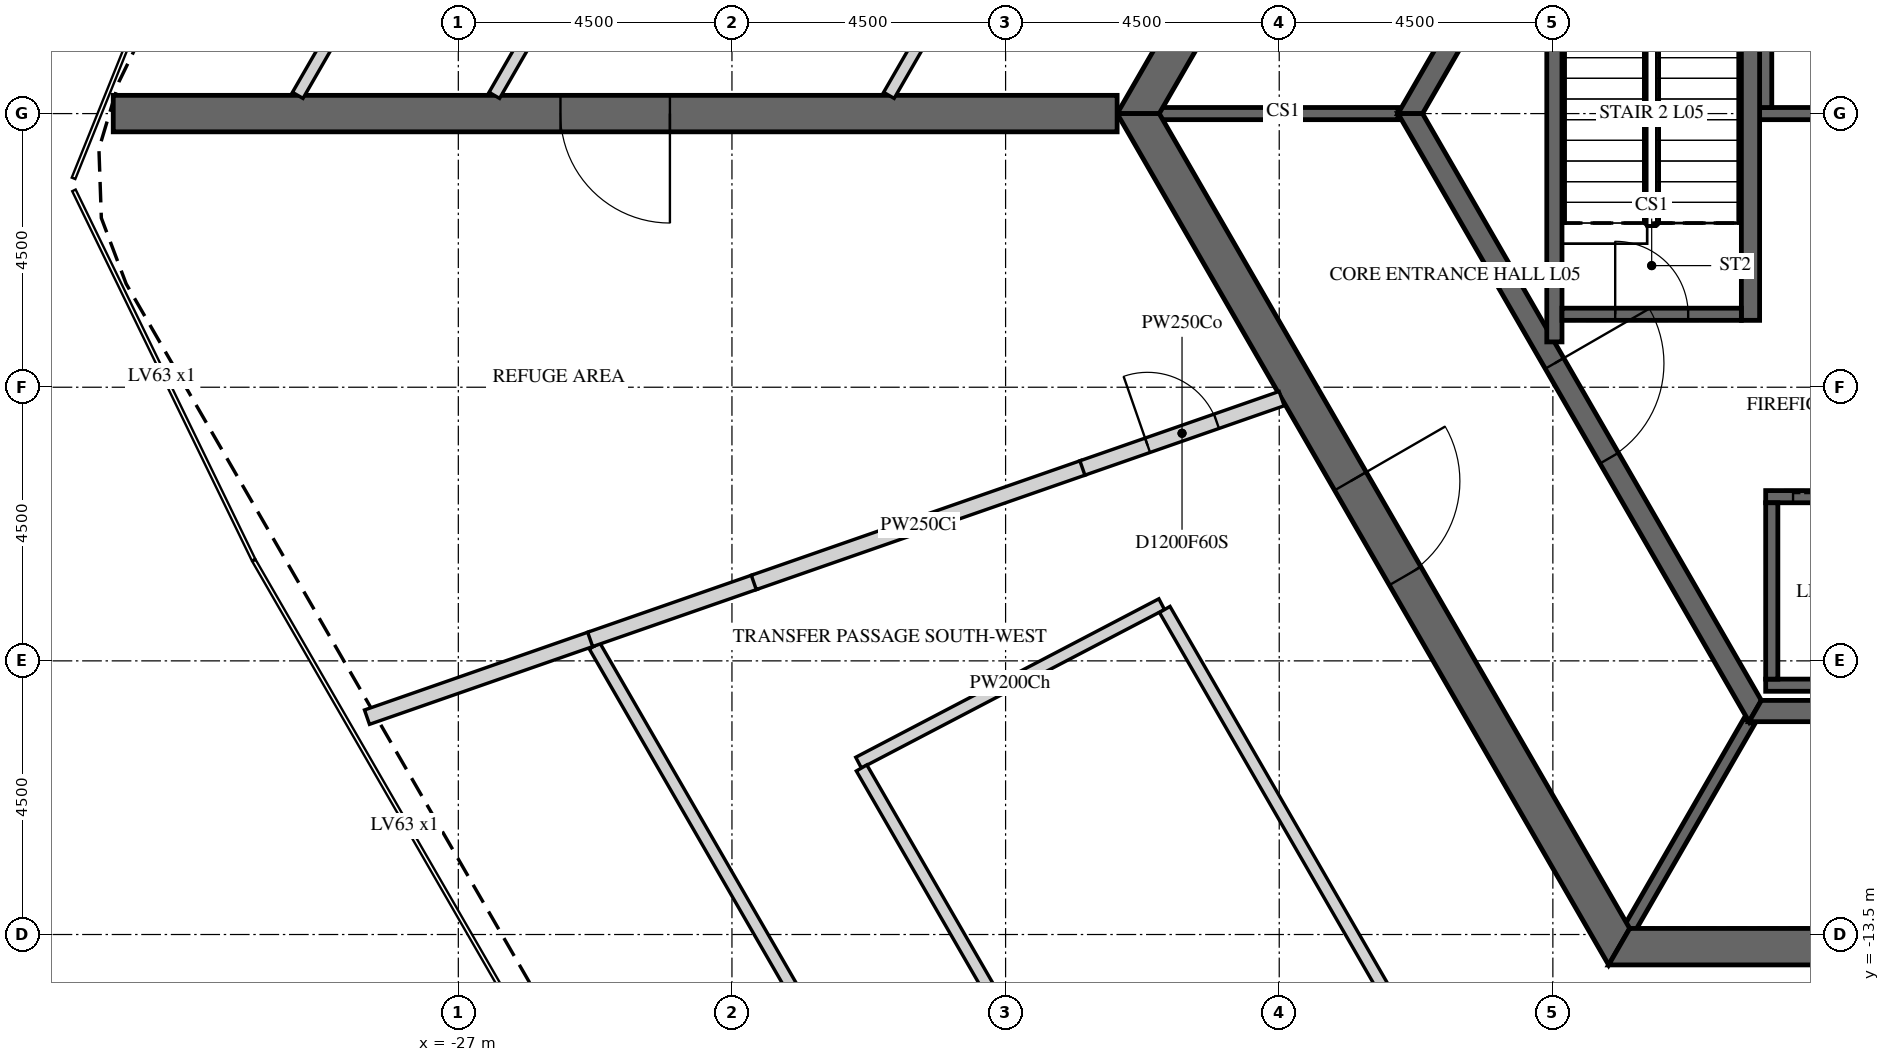
"""IFC4 building model, lengths in metres.
Left out: names, types, materials, properties, quantities, classifications, styles, units other than length and angle.
Written with IfcOpenShell. Run it as: python <this file> out.ifc"""

import sys

from ifc_helpers import new_model, si_unit, direction, frame, frame_2d, origin, place, context, subcontext, project, spatial, polyline, rectangle, outline, extrude, element, fill, save


model = new_model("IFC4")
c1 = context("Model", 3, precision=1e-05, world=origin(), true_north=direction((0.0, 1.0)))
c2 = subcontext(c1, "Body", "Model", "MODEL_VIEW")
j1 = project(units=[si_unit("LENGTHUNIT", "METRE"), si_unit("PLANEANGLEUNIT", "RADIAN")], contexts=[c1])
p1 = place(None, origin())
s1 = spatial("IfcSite", under=j1, at=p1, CompositionType="ELEMENT")
p2 = place(p1, origin())
s2 = spatial("IfcBuilding", under=s1, at=p2, CompositionType="ELEMENT")
p3 = place(p2, frame((0.0, 0.0, 31.5)))
s3 = spatial("IfcBuildingStorey", under=s2, at=p3, CompositionType="ELEMENT", Elevation=31.5)
p4 = place(p3, frame((-7.91, 13.7, -0.3), z_axis=(0.0, 0.0, 1.0), x_axis=(-0.499999880136, -0.866025472988, 0.0)))
e1 = element("IfcWall", 1, at=p4, inside=s3, PredefinedType="SHEAR", context=c2, shape_type="SweptSolid", body=[
    extrude(outline(polyline([(-0.173, -0.3), (15.993, -0.3), (15.646, 0.3), (0.173, 0.3), (-0.173, -0.3)])), origin(), (0.0, 0.0, 1.0), 6.15),
])
p5 = place(p4, frame((7.039, 0.0, 0.3)))
e2 = element("IfcOpeningElement", 2, at=p5, cuts=e1, PredefinedType="OPENING", context=c2, shape_type="SweptSolid", body=[
    extrude(rectangle(XDim=1.8, YDim=2.4, at=frame_2d((0.9, 1.2))), frame((0.0, 0.31, 0.0), z_axis=(0.0, -1.0, 0.0), x_axis=(1.0, 0.0, 0.0)), (0.0, 0.0, 1.0), 0.62),
])
p6 = place(p3, frame((-15.819, 0.0, -0.3), z_axis=(0.0, 0.0, 1.0), x_axis=(0.499999880136, -0.866025472988, 0.0)))
e3 = element("IfcWall", 3, at=p6, inside=s3, PredefinedType="SHEAR", context=c2, shape_type="SweptSolid", body=[
    extrude(outline(polyline([(-0.173, -0.3), (15.993, -0.3), (15.646, 0.3), (0.173, 0.3), (-0.173, -0.3)])), origin(), (0.0, 0.0, 1.0), 6.15),
])
p7 = place(p6, frame((6.981, 0.0, 0.3)))
e4 = element("IfcOpeningElement", 4, at=p7, cuts=e3, PredefinedType="OPENING", context=c2, shape_type="SweptSolid", body=[
    extrude(rectangle(XDim=1.8, YDim=2.4, at=frame_2d((0.9, 1.2))), frame((0.0, 0.31, 0.0), z_axis=(0.0, -1.0, 0.0), x_axis=(1.0, 0.0, 0.0)), (0.0, 0.0, 1.0), 0.62),
])
p8 = place(p3, frame((-7.91, -13.7, -0.3), z_axis=(0.0, 0.0, 1.0), x_axis=(1.0, 0.0, 0.0)))
e5 = element("IfcWall", 5, at=p8, inside=s3, PredefinedType="SHEAR", context=c2, shape_type="SweptSolid", body=[
    extrude(outline(polyline([(-0.173, -0.3), (15.993, -0.3), (15.646, 0.3), (0.173, 0.3), (-0.173, -0.3)])), origin(), (0.0, 0.0, 1.0), 6.15),
])
p9 = place(p8, frame((7.31, 0.0, 0.3)))
e6 = element("IfcOpeningElement", 6, at=p9, cuts=e5, PredefinedType="OPENING", context=c2, shape_type="SweptSolid", body=[
    extrude(rectangle(XDim=1.2, YDim=2.4, at=frame_2d((0.6, 1.2))), frame((0.0, 0.31, 0.0), z_axis=(0.0, -1.0, 0.0), x_axis=(1.0, 0.0, 0.0)), (0.0, 0.0, 1.0), 0.62),
])
p10 = place(p3, frame((-16.166, 0.0, -0.3), z_axis=(0.0, 0.0, 1.0), x_axis=(-1.0, 0.0, 0.0)))
e7 = element("IfcWall", 7, at=p10, inside=s3, PredefinedType="SHEAR", context=c2, shape_type="SweptSolid", body=[
    extrude(rectangle(XDim=16.509, YDim=0.6, at=frame_2d((8.254, 0.0))), origin(), (0.0, 0.0, 1.0), 6.15),
])
p11 = place(p10, frame((7.354, 0.0, 0.3)))
e8 = element("IfcOpeningElement", 8, at=p11, cuts=e7, PredefinedType="OPENING", context=c2, shape_type="SweptSolid", body=[
    extrude(rectangle(XDim=1.8, YDim=2.4, at=frame_2d((0.9, 1.2))), frame((0.0, 0.31, 0.0), z_axis=(0.0, -1.0, 0.0), x_axis=(1.0, 0.0, 0.0)), (0.0, 0.0, 1.0), 0.62),
])
p12 = place(p3, frame((-5.673, 9.825, -0.3), z_axis=(0.0, 0.0, 1.0), x_axis=(-0.499995046907, -0.866028263435, 0.0)))
e9 = element("IfcWall", 9, at=p12, inside=s3, PredefinedType="SHEAR", context=c2, shape_type="SweptSolid", body=[
    extrude(outline(polyline([(-0.101, -0.175), (11.446, -0.175), (11.244, 0.175), (0.101, 0.175), (-0.101, -0.175)])), origin(), (0.0, 0.0, 1.0), 6.15),
])
p13 = place(p12, frame((4.801, 0.0, 0.3)))
e10 = element("IfcOpeningElement", 10, at=p13, cuts=e9, PredefinedType="OPENING", context=c2, shape_type="SweptSolid", body=[
    extrude(rectangle(XDim=1.8, YDim=2.4, at=frame_2d((0.9, 1.2))), frame((0.0, 0.185, 0.0), z_axis=(0.0, -1.0, 0.0), x_axis=(1.0, 0.0, 0.0)), (0.0, 0.0, 1.0), 0.37),
])
p14 = place(p3, frame((-11.345, 0.0, -0.3), z_axis=(0.0, 0.0, 1.0), x_axis=(0.499995046907, -0.866028263435, 0.0)))
e11 = element("IfcWall", 11, at=p14, inside=s3, PredefinedType="SHEAR", context=c2, shape_type="SweptSolid", body=[
    extrude(outline(polyline([(-0.101, -0.175), (11.446, -0.175), (11.244, 0.175), (0.101, 0.175), (-0.101, -0.175)])), origin(), (0.0, 0.0, 1.0), 6.15),
])
p15 = place(p14, frame((4.744, 0.0, 0.3)))
e12 = element("IfcOpeningElement", 12, at=p15, cuts=e11, PredefinedType="OPENING", context=c2, shape_type="SweptSolid", body=[
    extrude(rectangle(XDim=1.8, YDim=2.4, at=frame_2d((0.9, 1.2))), frame((0.0, 0.185, 0.0), z_axis=(0.0, -1.0, 0.0), x_axis=(1.0, 0.0, 0.0)), (0.0, 0.0, 1.0), 0.37),
])
p16 = place(p3, frame((-5.673, -9.825, -0.3), z_axis=(0.0, 0.0, 1.0), x_axis=(1.0, 0.0, 0.0)))
e13 = element("IfcWall", 13, at=p16, inside=s3, PredefinedType="SHEAR", context=c2, shape_type="SweptSolid", body=[
    extrude(outline(polyline([(-0.101, -0.175), (11.446, -0.175), (11.244, 0.175), (0.101, 0.175), (-0.101, -0.175)])), origin(), (0.0, 0.0, 1.0), 6.15),
])
p17 = place(p3, frame((-5.6, 0.0, -0.25), z_axis=(0.0, 0.0, 1.0), x_axis=(1.0, 0.0, 0.0)))
e14 = element("IfcWall", 14, at=p17, inside=s3, PredefinedType="SHEAR", context=c2, shape_type="SweptSolid", body=[
    extrude(rectangle(XDim=11.2, YDim=0.2, at=frame_2d((5.6, 0.0))), origin(), (0.0, 0.0, 1.0), 6.0),
])
p18 = place(p3, frame((-5.5, 0.1, -0.25), z_axis=(0.0, 0.0, 1.0), x_axis=(0.0, 1.0, 0.0)))
e15 = element("IfcWall", 15, at=p18, inside=s3, PredefinedType="SHEAR", context=c2, shape_type="SweptSolid", body=[
    extrude(rectangle(XDim=3.1, YDim=0.2, at=frame_2d((1.55, 0.0))), origin(), (0.0, 0.0, 1.0), 6.0),
])
p19 = place(p3, frame((-5.5, -6.3, -0.25), z_axis=(0.0, 0.0, 1.0), x_axis=(1.0, 0.0, 0.0)))
e16 = element("IfcWall", 16, at=p19, inside=s3, PredefinedType="SHEAR", context=c2, shape_type="SweptSolid", body=[
    extrude(rectangle(XDim=9.2, YDim=0.2, at=frame_2d((4.6, 0.0))), origin(), (0.0, 0.0, 1.0), 6.0),
])
p20 = place(p19, frame((0.45, 0.0, 0.25)))
e17 = element("IfcOpeningElement", 17, at=p20, cuts=e16, PredefinedType="OPENING", context=c2, shape_type="SweptSolid", body=[
    extrude(rectangle(XDim=1.1, YDim=2.1, at=frame_2d((0.55, 1.05))), frame((0.0, 0.11, 0.0), z_axis=(0.0, -1.0, 0.0), x_axis=(1.0, 0.0, 0.0)), (0.0, 0.0, 1.0), 0.22),
])
p21 = place(p19, frame((2.25, 0.0, 0.25)))
e18 = element("IfcOpeningElement", 18, at=p21, cuts=e16, PredefinedType="OPENING", context=c2, shape_type="SweptSolid", body=[
    extrude(rectangle(XDim=1.1, YDim=2.1, at=frame_2d((0.55, 1.05))), frame((0.0, 0.11, 0.0), z_axis=(0.0, -1.0, 0.0), x_axis=(1.0, 0.0, 0.0)), (0.0, 0.0, 1.0), 0.22),
])
p22 = place(p19, frame((4.05, 0.0, 0.25)))
e19 = element("IfcOpeningElement", 19, at=p22, cuts=e16, PredefinedType="OPENING", context=c2, shape_type="SweptSolid", body=[
    extrude(rectangle(XDim=1.1, YDim=2.1, at=frame_2d((0.55, 1.05))), frame((0.0, 0.11, 0.0), z_axis=(0.0, -1.0, 0.0), x_axis=(1.0, 0.0, 0.0)), (0.0, 0.0, 1.0), 0.22),
])
p23 = place(p19, frame((5.85, 0.0, 0.25)))
e20 = element("IfcOpeningElement", 20, at=p23, cuts=e16, PredefinedType="OPENING", context=c2, shape_type="SweptSolid", body=[
    extrude(rectangle(XDim=1.1, YDim=2.1, at=frame_2d((0.55, 1.05))), frame((0.0, 0.11, 0.0), z_axis=(0.0, -1.0, 0.0), x_axis=(1.0, 0.0, 0.0)), (0.0, 0.0, 1.0), 0.22),
])
p24 = place(p19, frame((7.65, 0.0, 0.25)))
e21 = element("IfcOpeningElement", 21, at=p24, cuts=e16, PredefinedType="OPENING", context=c2, shape_type="SweptSolid", body=[
    extrude(rectangle(XDim=1.1, YDim=2.1, at=frame_2d((0.55, 1.05))), frame((0.0, 0.11, 0.0), z_axis=(0.0, -1.0, 0.0), x_axis=(1.0, 0.0, 0.0)), (0.0, 0.0, 1.0), 0.22),
])
p25 = place(p3, frame((-5.5, -9.4, -0.25), z_axis=(0.0, 0.0, 1.0), x_axis=(1.0, 0.0, 0.0)))
e22 = element("IfcWall", 22, at=p25, inside=s3, PredefinedType="SHEAR", context=c2, shape_type="SweptSolid", body=[
    extrude(rectangle(XDim=9.2, YDim=0.2, at=frame_2d((4.6, 0.0))), origin(), (0.0, 0.0, 1.0), 6.0),
])
p26 = place(p3, frame((-5.4, -9.3, -0.25), z_axis=(0.0, 0.0, 1.0), x_axis=(0.0, 1.0, 0.0)))
e23 = element("IfcWall", 23, at=p26, inside=s3, PredefinedType="SHEAR", context=c2, shape_type="SweptSolid", body=[
    extrude(rectangle(XDim=2.9, YDim=0.2, at=frame_2d((1.45, 0.0))), origin(), (0.0, 0.0, 1.0), 6.0),
])
p27 = place(p3, frame((-11.547, 0.0, -0.3), z_axis=(0.0, 0.0, 1.0), x_axis=(-1.0, 0.0, 0.0)))
e24 = element("IfcWall", 24, at=p27, inside=s3, PredefinedType="SHEAR", context=c2, shape_type="SweptSolid", body=[
    extrude(rectangle(XDim=3.926, YDim=0.2, at=frame_2d((1.963, 0.0))), origin(), (0.0, 0.0, 1.0), 6.15),
])
p28 = place(p3, frame((-5.773, -10.0, -0.3), z_axis=(0.0, 0.0, 1.0), x_axis=(-0.500038251005, -0.86600331843, 0.0)))
e25 = element("IfcWall", 25, at=p28, inside=s3, PredefinedType="SHEAR", context=c2, shape_type="SweptSolid", body=[
    extrude(rectangle(XDim=3.926, YDim=0.2, at=frame_2d((1.963, 0.0))), origin(), (0.0, 0.0, 1.0), 6.15),
])
p29 = place(p3, frame((-5.75, -3.4, -0.25), z_axis=(0.0, 0.0, 1.0), x_axis=(0.0, 1.0, 0.0)))
e26 = element("IfcWall", 26, at=p29, inside=s3, PredefinedType="SHEAR", context=c2, shape_type="SweptSolid", body=[
    extrude(rectangle(XDim=6.8, YDim=0.3, at=frame_2d((3.4, 0.0))), origin(), (0.0, 0.0, 1.0), 6.0),
])
p30 = place(p3, frame((-8.975, -3.755, -0.25), z_axis=(0.0, 0.0, 1.0), x_axis=(0.0, 1.0, 0.0)))
e27 = element("IfcWall", 27, at=p30, inside=s3, PredefinedType="SHEAR", context=c2, shape_type="SweptSolid", body=[
    extrude(rectangle(XDim=7.51, YDim=0.25, at=frame_2d((3.755, 0.0))), origin(), (0.0, 0.0, 1.0), 6.0),
])
p31 = place(p3, frame((-8.85, -3.3, -0.25), z_axis=(0.0, 0.0, 1.0), x_axis=(1.0, 0.0, 0.0)))
e28 = element("IfcWall", 28, at=p31, inside=s3, PredefinedType="SHEAR", context=c2, shape_type="SweptSolid", body=[
    extrude(rectangle(XDim=2.95, YDim=0.2, at=frame_2d((1.475, 0.0))), origin(), (0.0, 0.0, 1.0), 6.0),
])
p32 = place(p31, frame((0.875, 0.0, 0.25)))
e29 = element("IfcOpeningElement", 29, at=p32, cuts=e28, PredefinedType="OPENING", context=c2, shape_type="SweptSolid", body=[
    extrude(rectangle(XDim=1.2, YDim=2.4, at=frame_2d((0.6, 1.2))), frame((0.0, 0.11, 0.0), z_axis=(0.0, -1.0, 0.0), x_axis=(1.0, 0.0, 0.0)), (0.0, 0.0, 1.0), 0.22),
])
p33 = place(p3, frame((-15.379, 19.403, 0.0), z_axis=(0.0, 0.0, 1.0), x_axis=(-0.499997101594, -0.866027077174, 0.0)))
e30 = element("IfcWall", 30, at=p33, inside=s3, PredefinedType="PARTITIONING", context=c2, shape_type="SweptSolid", body=[
    extrude(rectangle(XDim=22.058, YDim=0.2, at=frame_2d((11.029, 0.0))), origin(), (0.0, 0.0, 1.0), 5.85),
])
p34 = place(p33, frame((10.529, 0.0, 0.0)))
e31 = element("IfcOpeningElement", 31, at=p34, cuts=e30, PredefinedType="OPENING", context=c2, shape_type="SweptSolid", body=[
    extrude(rectangle(XDim=1.0, YDim=2.1, at=frame_2d((0.5, 1.05))), frame((0.0, 0.11, 0.0), z_axis=(0.0, -1.0, 0.0), x_axis=(1.0, 0.0, 0.0)), (0.0, 0.0, 1.0), 0.22),
])
p35 = place(p3, frame((-16.286, -23.432, 0.0), z_axis=(0.0, 0.0, 1.0), x_axis=(-0.49996436611, 0.866045976043, 0.0)))
e32 = element("IfcWall", 32, at=p35, inside=s3, PredefinedType="PARTITIONING", context=c2, shape_type="SweptSolid", body=[
    extrude(rectangle(XDim=16.948, YDim=0.2, at=frame_2d((8.474, 0.0))), origin(), (0.0, 0.0, 1.0), 5.85),
])
p36 = place(p35, frame((7.974, 0.0, 0.0)))
e33 = element("IfcOpeningElement", 33, at=p36, cuts=e32, PredefinedType="OPENING", context=c2, shape_type="SweptSolid", body=[
    extrude(rectangle(XDim=1.0, YDim=2.1, at=frame_2d((0.5, 1.05))), frame((0.0, 0.11, 0.0), z_axis=(0.0, -1.0, 0.0), x_axis=(1.0, 0.0, 0.0)), (0.0, 0.0, 1.0), 0.22),
])
p37 = place(p3, frame((-24.813, -8.641, 0.0), z_axis=(0.0, 0.0, 1.0), x_axis=(-0.944373627708, -0.328874522105, 0.0)))
e34 = element("IfcWall", 34, at=p37, inside=s3, PredefinedType="PARTITIONING", context=c2, shape_type="SweptSolid", body=[
    extrude(rectangle(XDim=3.906, YDim=0.25, at=frame_2d((1.953, 0.0))), origin(), (0.0, 0.0, 1.0), 5.088),
])
p38 = place(p3, frame((-22.122, -7.704, 0.0), z_axis=(0.0, 0.0, 1.0), x_axis=(-0.944466947751, -0.328606428127, 0.0)))
e35 = element("IfcWall", 35, at=p38, inside=s3, PredefinedType="PARTITIONING", context=c2, shape_type="SweptSolid", body=[
    extrude(rectangle(XDim=2.869, YDim=0.25, at=frame_2d((1.435, 0.0))), origin(), (0.0, 0.0, 1.0), 5.088),
])
p39 = place(p3, frame((-20.418, -10.674, 0.0), z_axis=(0.0, 0.0, 1.0), x_axis=(0.886208434204, 0.463286748295, 0.0)))
e36 = element("IfcWall", 36, at=p39, inside=s3, PredefinedType="PARTITIONING", context=c2, shape_type="SweptSolid", body=[
    extrude(rectangle(XDim=5.625, YDim=0.2, at=frame_2d((2.812, 0.0))), origin(), (0.0, 0.0, 1.0), 5.096),
])
p40 = place(p3, frame((-29.641, 0.3, 0.0), z_axis=(0.0, 0.0, 1.0), x_axis=(0.49998168022, 0.866035980456, 0.0)))
e37 = element("IfcWall", 37, at=p40, inside=s3, PredefinedType="PARTITIONING", context=c2, shape_type="SweptSolid", body=[
    extrude(rectangle(XDim=19.947, YDim=0.2, at=frame_2d((9.973, 0.0))), origin(), (0.0, 0.0, 1.0), 5.85),
])
p41 = place(p40, frame((9.473, 0.0, 0.0)))
e38 = element("IfcOpeningElement", 38, at=p41, cuts=e37, PredefinedType="OPENING", context=c2, shape_type="SweptSolid", body=[
    extrude(rectangle(XDim=1.0, YDim=2.1, at=frame_2d((0.5, 1.05))), frame((0.0, 0.11, 0.0), z_axis=(0.0, -1.0, 0.0), x_axis=(1.0, 0.0, 0.0)), (0.0, 0.0, 1.0), 0.22),
])
p42 = place(p3, frame((-16.718, -5.822, 0.0), z_axis=(0.0, 0.0, 1.0), x_axis=(-0.944407858517, -0.328776210774, 0.0)))
e39 = element("IfcWall", 39, at=p42, inside=s3, PredefinedType="PARTITIONING", context=c2, shape_type="SweptSolid", body=[
    extrude(rectangle(XDim=5.742, YDim=0.25, at=frame_2d((2.871, 0.0))), origin(), (0.0, 0.0, 1.0), 5.088),
])
p43 = place(p3, frame((-15.383, -8.155, 0.0), z_axis=(0.0, 0.0, 1.0), x_axis=(0.499963979216, -0.866046199395, 0.0)))
e40 = element("IfcWall", 40, at=p43, inside=s3, PredefinedType="PARTITIONING", context=c2, shape_type="SweptSolid", body=[
    extrude(rectangle(XDim=10.675, YDim=0.2, at=frame_2d((5.337, 0.0))), origin(), (0.0, 0.0, 1.0), 5.85),
])
p44 = place(p3, frame((-16.737, -5.828, 0.0), z_axis=(0.0, 0.0, 1.0), x_axis=(0.944406589831, 0.328779855046, 0.0)))
e41 = element("IfcWall", 41, at=p44, inside=s3, PredefinedType="PARTITIONING", context=c2, shape_type="SweptSolid", body=[
    extrude(rectangle(XDim=3.47, YDim=0.25, at=frame_2d((1.735, 0.0))), origin(), (0.0, 0.0, 1.0), 5.85),
])
p45 = place(p44, frame((1.135, 0.0, 0.0)))
e42 = element("IfcOpeningElement", 42, at=p45, cuts=e41, PredefinedType="OPENING", context=c2, shape_type="SweptSolid", body=[
    extrude(rectangle(XDim=1.2, YDim=2.1, at=frame_2d((0.6, 1.05))), frame((0.0, 0.135, 0.0), z_axis=(0.0, -1.0, 0.0), x_axis=(1.0, 0.0, 0.0)), (0.0, 0.0, 1.0), 0.27),
])
p46 = place(p3, frame((-20.368, -10.761, 0.0), z_axis=(0.0, 0.0, 1.0), x_axis=(0.49994739805, -0.866055771404, 0.0)))
e43 = element("IfcWall", 43, at=p46, inside=s3, PredefinedType="PARTITIONING", context=c2, shape_type="SweptSolid", body=[
    extrude(rectangle(XDim=14.155, YDim=0.2, at=frame_2d((7.078, 0.0))), origin(), (0.0, 0.0, 1.0), 5.85),
])
p47 = place(p46, frame((6.578, 0.0, 0.0)))
e44 = element("IfcOpeningElement", 44, at=p47, cuts=e43, PredefinedType="OPENING", context=c2, shape_type="SweptSolid", body=[
    extrude(rectangle(XDim=1.0, YDim=2.1, at=frame_2d((0.5, 1.05))), frame((0.0, 0.11, 0.0), z_axis=(0.0, -1.0, 0.0), x_axis=(1.0, 0.0, 0.0)), (0.0, 0.0, 1.0), 0.22),
])
p48 = place(p3, frame((-11.678, 14.573, 0.0), z_axis=(0.0, 0.0, 1.0), x_axis=(-0.500039172404, -0.866002786405, 0.0)))
e45 = element("IfcWall", 45, at=p48, inside=s3, PredefinedType="PARTITIONING", context=c2, shape_type="SweptSolid", body=[
    extrude(rectangle(XDim=16.481, YDim=0.2, at=frame_2d((8.241, 0.0))), origin(), (0.0, 0.0, 1.0), 5.85),
])
p49 = place(p7, origin())
e46 = element("IfcDoor", 46, at=p49, inside=s3, OperationType="DOUBLE_DOOR_SINGLE_SWING", PredefinedType="DOOR", context=c2, shape_type="SweptSolid", body=[
    extrude(rectangle(XDim=1.8, YDim=2.4, at=frame_2d((0.9, 1.2))), frame((0.0, 0.025, 0.0), z_axis=(0.0, -1.0, 0.0), x_axis=(1.0, 0.0, 0.0)), (0.0, 0.0, 1.0), 0.05),
])
fill(e4, e46)
p50 = place(p11, origin())
e47 = element("IfcDoor", 47, at=p50, inside=s3, OperationType="DOUBLE_DOOR_SINGLE_SWING", PredefinedType="DOOR", context=c2, shape_type="SweptSolid", body=[
    extrude(rectangle(XDim=1.8, YDim=2.4, at=frame_2d((0.9, 1.2))), frame((0.0, 0.025, 0.0), z_axis=(0.0, -1.0, 0.0), x_axis=(1.0, 0.0, 0.0)), (0.0, 0.0, 1.0), 0.05),
])
fill(e8, e47)
p51 = place(p15, origin())
e48 = element("IfcDoor", 48, at=p51, inside=s3, OperationType="DOUBLE_DOOR_SINGLE_SWING", PredefinedType="DOOR", context=c2, shape_type="SweptSolid", body=[
    extrude(rectangle(XDim=1.8, YDim=2.4, at=frame_2d((0.9, 1.2))), frame((0.0, 0.025, 0.0), z_axis=(0.0, -1.0, 0.0), x_axis=(1.0, 0.0, 0.0)), (0.0, 0.0, 1.0), 0.05),
])
fill(e12, e48)
p52 = place(p32, origin())
e49 = element("IfcDoor", 49, at=p52, inside=s3, OperationType="SINGLE_SWING_LEFT", PredefinedType="DOOR", context=c2, shape_type="SweptSolid", body=[
    extrude(rectangle(XDim=1.2, YDim=2.4, at=frame_2d((0.6, 1.2))), frame((0.0, 0.025, 0.0), z_axis=(0.0, -1.0, 0.0), x_axis=(1.0, 0.0, 0.0)), (0.0, 0.0, 1.0), 0.05),
])
fill(e29, e49)
p53 = place(p20, origin())
e50 = element("IfcDoor", 50, at=p53, inside=s3, OperationType="SLIDING_TO_LEFT", PredefinedType="DOOR", context=c2, shape_type="SweptSolid", body=[
    extrude(rectangle(XDim=1.1, YDim=2.1, at=frame_2d((0.55, 1.05))), frame((0.0, 0.025, 0.0), z_axis=(0.0, -1.0, 0.0), x_axis=(1.0, 0.0, 0.0)), (0.0, 0.0, 1.0), 0.05),
])
fill(e17, e50)
p54 = place(p45, origin())
e51 = element("IfcDoor", 51, at=p54, inside=s3, OperationType="SINGLE_SWING_RIGHT", PredefinedType="DOOR", context=c2, shape_type="SweptSolid", body=[
    extrude(rectangle(XDim=1.2, YDim=2.1, at=frame_2d((0.6, 1.05))), frame((0.0, 0.025, 0.0), z_axis=(0.0, -1.0, 0.0), x_axis=(1.0, 0.0, 0.0)), (0.0, 0.0, 1.0), 0.05),
])
fill(e42, e51)
save(model, sys.argv[1])
